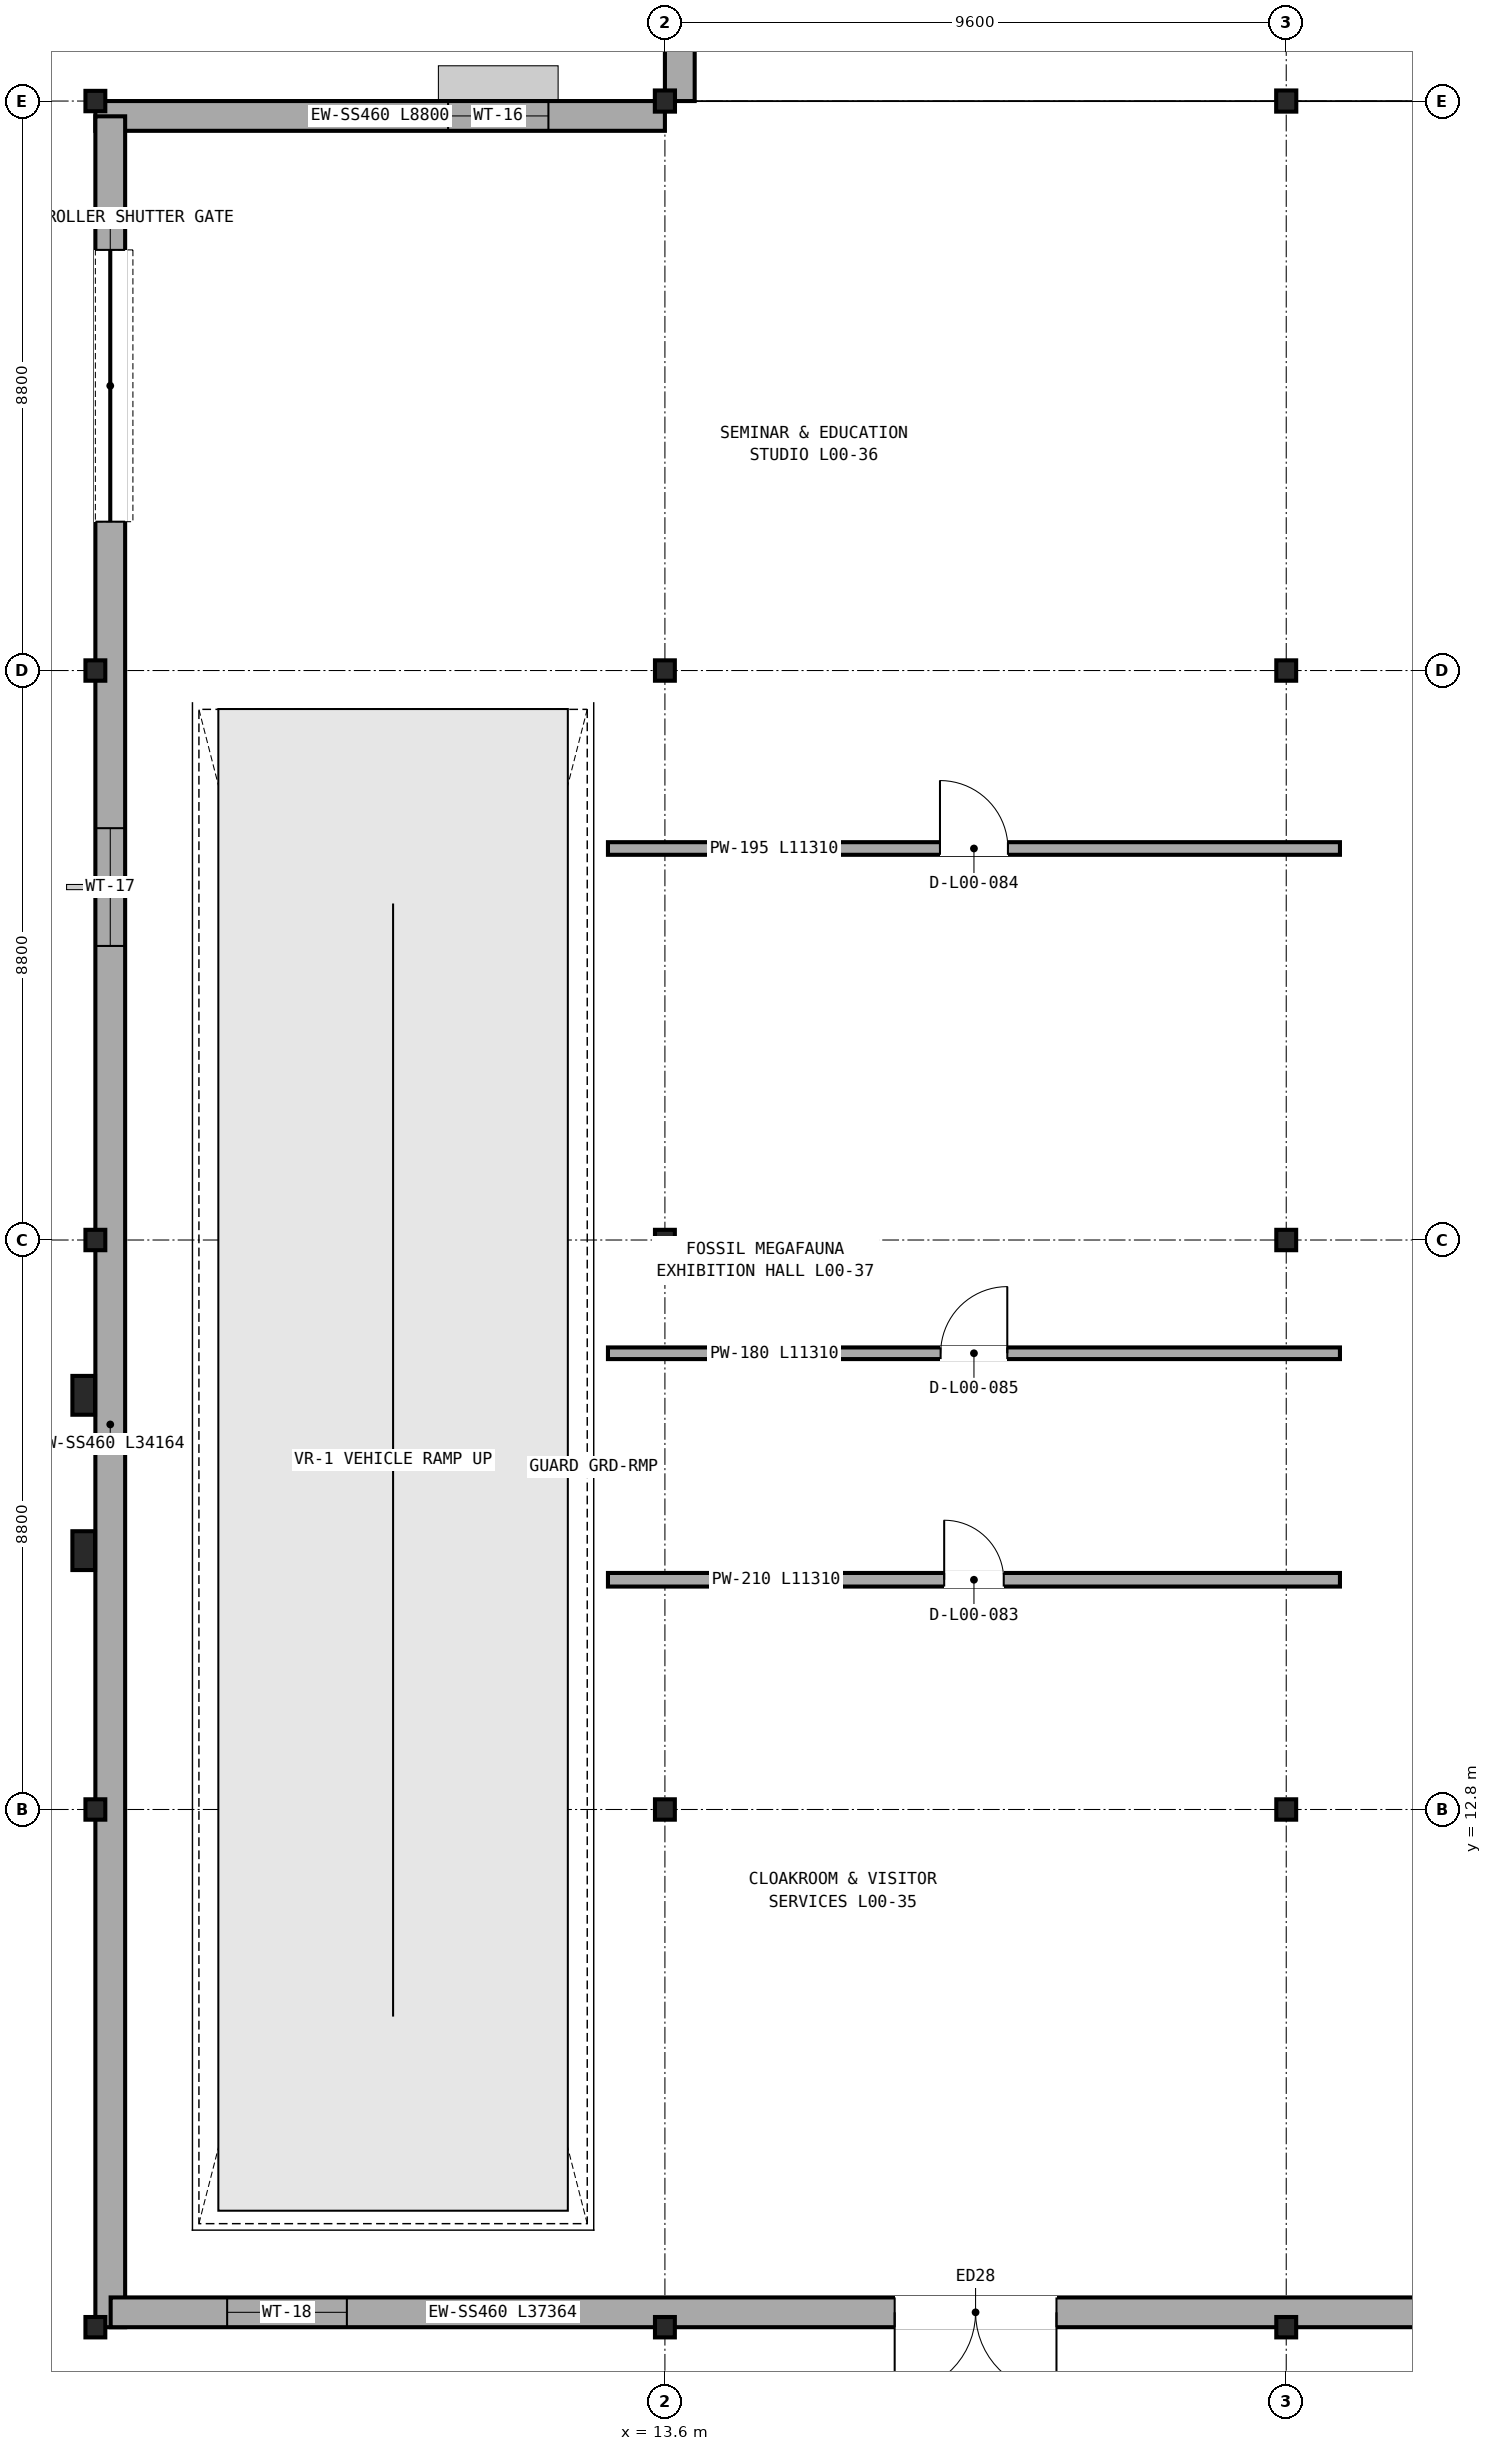
"""IFC4 building model, lengths in metres.
Left out: names, types, materials, properties, quantities, classifications, styles, units other than length and angle.
Written with IfcOpenShell. Run it as: python <this file> out.ifc"""

import sys

from ifc_helpers import new_model, si_unit, direction, frame, frame_2d, origin, origin_2d, place, context, subcontext, project, spatial, rectangle, i_section, extrude, element, fill, save


model = new_model("IFC4")
c1 = context("Model", 3, precision=1e-05, world=origin(), true_north=direction((0.0, 1.0)))
c2 = subcontext(c1, "Body", "Model", "MODEL_VIEW")
j1 = project(units=[si_unit("LENGTHUNIT", "METRE"), si_unit("PLANEANGLEUNIT", "RADIAN")], contexts=[c1])
p1 = place(None, origin())
s1 = spatial("IfcSite", under=j1, at=p1, CompositionType="ELEMENT")
p2 = place(p1, origin())
s2 = spatial("IfcBuilding", under=s1, at=p2, CompositionType="ELEMENT")
p3 = place(p2, origin())
s3 = spatial("IfcBuildingStorey", under=s2, at=p3, CompositionType="ELEMENT", Elevation=0.0)
for number, where, z_axis, x_axis in (
    (1, (4.8, 4.8, 0.0), (0.0, 0.0, 1.0), (1.0, 0.0, 0.0)),
    (2, (4.8, 12.8, 0.0), (0.0, 0.0, 1.0), (1.0, 0.0, 0.0)),
    (3, (4.8, 21.6, 0.0), (0.0, 0.0, 1.0), (1.0, 0.0, 0.0)),
    (4, (4.8, 30.4, 0.0), (0.0, 0.0, 1.0), (1.0, 0.0, 0.0)),
    (5, (4.8, 39.2, 0.0), (0.0, 0.0, 1.0), (1.0, 0.0, 0.0)),
    (6, (13.6, 4.8, 0.0), (0.0, 0.0, 1.0), (1.0, 0.0, 0.0)),
    (7, (13.6, 12.8, 0.0), (0.0, 0.0, 1.0), (1.0, 0.0, 0.0)),
    (8, (13.6, 21.6, 0.0), (0.0, 0.0, 1.0), (1.0, 0.0, 0.0)),
    (9, (13.6, 30.4, 0.0), (0.0, 0.0, 1.0), (1.0, 0.0, 0.0)),
):
    element("IfcColumn", number, at=place(p3, frame(where, z_axis=z_axis, x_axis=x_axis)), inside=s3, PredefinedType="COLUMN", context=c2, shape_type="SweptSolid", body=[
        extrude(i_section(OverallWidth=0.307, OverallDepth=0.315, WebThickness=0.012, FlangeThickness=0.019, FilletRadius=0.017, at=origin_2d()), origin(), (0.0, 0.0, 1.0), 5.6),
    ])
p4 = place(p3, frame((13.6, 39.2, 0.0), z_axis=(0.0, 0.0, 1.0), x_axis=(1.0, 0.0, 0.0)))
e10 = element("IfcColumn", 10, at=p4, inside=s3, PredefinedType="COLUMN", context=c2, shape_type="SweptSolid", body=[
    extrude(i_section(OverallWidth=0.311, OverallDepth=0.327, WebThickness=0.016, FlangeThickness=0.025, FilletRadius=0.017, at=origin_2d()), origin(), (0.0, 0.0, 1.0), 5.6),
])
for number, where, z_axis, x_axis in (
    (11, (23.2, 4.8, 0.0), (0.0, 0.0, 1.0), (1.0, 0.0, 0.0)),
    (12, (23.2, 12.8, 0.0), (0.0, 0.0, 1.0), (1.0, 0.0, 0.0)),
    (13, (23.2, 21.6, 0.0), (0.0, 0.0, 1.0), (1.0, 0.0, 0.0)),
    (14, (23.2, 30.4, 0.0), (0.0, 0.0, 1.0), (1.0, 0.0, 0.0)),
):
    element("IfcColumn", number, at=place(p3, frame(where, z_axis=z_axis, x_axis=x_axis)), inside=s3, PredefinedType="COLUMN", context=c2, shape_type="SweptSolid", body=[
        extrude(i_section(OverallWidth=0.307, OverallDepth=0.315, WebThickness=0.012, FlangeThickness=0.019, FilletRadius=0.017, at=origin_2d()), origin(), (0.0, 0.0, 1.0), 5.6),
    ])
p5 = place(p3, frame((23.2, 39.2, 0.0), z_axis=(0.0, 0.0, 1.0), x_axis=(1.0, 0.0, 0.0)))
e15 = element("IfcColumn", 15, at=p5, inside=s3, PredefinedType="COLUMN", context=c2, shape_type="SweptSolid", body=[
    extrude(i_section(OverallWidth=0.311, OverallDepth=0.327, WebThickness=0.016, FlangeThickness=0.025, FilletRadius=0.017, at=origin_2d()), origin(), (0.0, 0.0, 1.0), 5.6),
])
for number, where, z_axis, x_axis in (
    (16, (4.62, 16.8, 0.0), (0.0, 0.0, 1.0), (0.0, 1.0, 0.0)),
    (17, (4.62, 19.2, 0.0), (0.0, 0.0, 1.0), (0.0, 1.0, 0.0)),
):
    element("IfcColumn", number, at=place(p3, frame(where, z_axis=z_axis, x_axis=x_axis)), inside=s3, PredefinedType="PILASTER", context=c2, shape_type="SweptSolid", body=[
        extrude(rectangle(XDim=0.6, YDim=0.35, at=origin_2d()), origin(), (0.0, 0.0, 1.0), 5.39),
    ])
p6 = place(p3, frame((13.83, 91.764, 0.0), z_axis=(0.0, 0.0, 1.0), x_axis=(0.0, -1.0, 0.0)))
e18 = element("IfcWall", 18, at=p6, inside=s3, PredefinedType="SOLIDWALL", context=c2, shape_type="SweptSolid", body=[
    extrude(rectangle(XDim=52.564, YDim=0.46, at=frame_2d((26.282, 0.0))), origin(), (0.0, 0.0, 1.0), 4.653),
])
p7 = place(p6, frame((29.314, 0.0, 0.0)))
e19 = element("IfcOpeningElement", 19, at=p7, cuts=e18, PredefinedType="OPENING", context=c2, shape_type="SweptSolid", body=[
    extrude(rectangle(XDim=2.5, YDim=2.55, at=frame_2d((1.25, 1.275))), frame((0.0, 0.24, 0.0), z_axis=(0.0, -1.0, 0.0), x_axis=(1.0, 0.0, 0.0)), (0.0, 0.0, 1.0), 0.48),
])
p8 = place(p6, frame((20.539, 0.0, 0.0)))
e20 = element("IfcOpeningElement", 20, at=p8, cuts=e18, PredefinedType="OPENING", context=c2, shape_type="SweptSolid", body=[
    extrude(rectangle(XDim=2.45, YDim=2.5, at=frame_2d((1.225, 1.25))), frame((0.0, 0.24, 0.0), z_axis=(0.0, -1.0, 0.0), x_axis=(1.0, 0.0, 0.0)), (0.0, 0.0, 1.0), 0.48),
])
p9 = place(p6, frame((11.764, 0.0, 0.0)))
e21 = element("IfcOpeningElement", 21, at=p9, cuts=e18, PredefinedType="OPENING", context=c2, shape_type="SweptSolid", body=[
    extrude(rectangle(XDim=2.4, YDim=2.45, at=frame_2d((1.2, 1.225))), frame((0.0, 0.24, 0.0), z_axis=(0.0, -1.0, 0.0), x_axis=(1.0, 0.0, 0.0)), (0.0, 0.0, 1.0), 0.48),
])
p10 = place(p6, frame((3.014, 0.0, 0.0)))
e22 = element("IfcOpeningElement", 22, at=p10, cuts=e18, PredefinedType="OPENING", context=c2, shape_type="SweptSolid", body=[
    extrude(rectangle(XDim=2.3, YDim=2.4, at=frame_2d((1.15, 1.2))), frame((0.0, 0.24, 0.0), z_axis=(0.0, -1.0, 0.0), x_axis=(1.0, 0.0, 0.0)), (0.0, 0.0, 1.0), 0.48),
])
p11 = place(p6, frame((37.564, 0.0, 0.0)))
e23 = element("IfcOpeningElement", 23, at=p11, cuts=e18, PredefinedType="OPENING", context=c2, shape_type="SweptSolid", body=[
    extrude(rectangle(XDim=2.4, YDim=2.45, at=frame_2d((1.2, 1.225))), frame((0.0, 0.24, 0.0), z_axis=(0.0, -1.0, 0.0), x_axis=(1.0, 0.0, 0.0)), (0.0, 0.0, 1.0), 0.48),
])
p12 = place(p6, frame((6.4, 0.0, 0.9)))
e24 = element("IfcOpeningElement", 24, at=p12, cuts=e18, PredefinedType="OPENING", context=c2, shape_type="SweptSolid", body=[
    extrude(rectangle(XDim=1.4, YDim=1.85, at=frame_2d((0.7, 0.925))), frame((0.0, 0.24, 0.0), z_axis=(0.0, -1.0, 0.0), x_axis=(1.0, 0.0, 0.0)), (0.0, 0.0, 1.0), 0.48),
])
p13 = place(p3, frame((13.6, 38.97, 0.0), z_axis=(0.0, 0.0, 1.0), x_axis=(-1.0, 0.0, 0.0)))
e25 = element("IfcWall", 25, at=p13, inside=s3, PredefinedType="SOLIDWALL", context=c2, shape_type="SweptSolid", body=[
    extrude(rectangle(XDim=8.8, YDim=0.46, at=frame_2d((4.4, 0.0))), origin(), (0.0, 0.0, 1.0), 4.653),
])
p14 = place(p13, frame((1.8, 0.0, 0.9)))
e26 = element("IfcOpeningElement", 26, at=p14, cuts=e25, PredefinedType="OPENING", context=c2, shape_type="SweptSolid", body=[
    extrude(rectangle(XDim=1.55, YDim=1.85, at=frame_2d((0.775, 0.925))), frame((0.0, 0.24, 0.0), z_axis=(0.0, -1.0, 0.0), x_axis=(1.0, 0.0, 0.0)), (0.0, 0.0, 1.0), 0.48),
])
p15 = place(p3, frame((5.03, 38.964, 0.0), z_axis=(0.0, 0.0, 1.0), x_axis=(0.0, -1.0, 0.0)))
e27 = element("IfcWall", 27, at=p15, inside=s3, PredefinedType="SOLIDWALL", context=c2, shape_type="SweptSolid", body=[
    extrude(rectangle(XDim=34.164, YDim=0.46, at=frame_2d((17.082, 0.0))), origin(), (0.0, 0.0, 1.0), 4.763),
])
p16 = place(p15, frame((2.064, 0.0, 0.0)))
e28 = element("IfcOpeningElement", 28, at=p16, cuts=e27, PredefinedType="OPENING", context=c2, shape_type="SweptSolid", body=[
    extrude(rectangle(XDim=4.2, YDim=4.1, at=frame_2d((2.1, 2.05))), frame((0.0, 0.24, 0.0), z_axis=(0.0, -1.0, 0.0), x_axis=(1.0, 0.0, 0.0)), (0.0, 0.0, 1.0), 0.48),
])
p17 = place(p15, frame((11.0, 0.0, 0.9)))
e29 = element("IfcOpeningElement", 29, at=p17, cuts=e27, PredefinedType="OPENING", context=c2, shape_type="SweptSolid", body=[
    extrude(rectangle(XDim=1.82, YDim=1.85, at=frame_2d((0.91, 0.925))), frame((0.0, 0.24, 0.0), z_axis=(0.0, -1.0, 0.0), x_axis=(1.0, 0.0, 0.0)), (0.0, 0.0, 1.0), 0.48),
])
p18 = place(p3, frame((5.036, 5.03, 0.0), z_axis=(0.0, 0.0, 1.0), x_axis=(1.0, 0.0, 0.0)))
e30 = element("IfcWall", 30, at=p18, inside=s3, PredefinedType="SOLIDWALL", context=c2, shape_type="SweptSolid", body=[
    extrude(rectangle(XDim=37.364, YDim=0.46, at=frame_2d((18.682, 0.0))), origin(), (0.0, 0.0, 1.0), 4.802),
])
p19 = place(p18, frame((12.114, 0.0, 0.0)))
e31 = element("IfcOpeningElement", 31, at=p19, cuts=e30, PredefinedType="OPENING", context=c2, shape_type="SweptSolid", body=[
    extrude(rectangle(XDim=2.5, YDim=2.55, at=frame_2d((1.25, 1.275))), frame((0.0, 0.24, 0.0), z_axis=(0.0, -1.0, 0.0), x_axis=(1.0, 0.0, 0.0)), (0.0, 0.0, 1.0), 0.48),
])
p20 = place(p18, frame((21.739, 0.0, 0.0)))
e32 = element("IfcOpeningElement", 32, at=p20, cuts=e30, PredefinedType="OPENING", context=c2, shape_type="SweptSolid", body=[
    extrude(rectangle(XDim=2.45, YDim=2.5, at=frame_2d((1.225, 1.25))), frame((0.0, 0.24, 0.0), z_axis=(0.0, -1.0, 0.0), x_axis=(1.0, 0.0, 0.0)), (0.0, 0.0, 1.0), 0.48),
])
p21 = place(p18, frame((31.364, 0.0, 0.0)))
e33 = element("IfcOpeningElement", 33, at=p21, cuts=e30, PredefinedType="OPENING", context=c2, shape_type="SweptSolid", body=[
    extrude(rectangle(XDim=2.4, YDim=2.45, at=frame_2d((1.2, 1.225))), frame((0.0, 0.24, 0.0), z_axis=(0.0, -1.0, 0.0), x_axis=(1.0, 0.0, 0.0)), (0.0, 0.0, 1.0), 0.48),
])
p22 = place(p18, frame((1.8, 0.0, 0.9)))
e34 = element("IfcOpeningElement", 34, at=p22, cuts=e30, PredefinedType="OPENING", context=c2, shape_type="SweptSolid", body=[
    extrude(rectangle(XDim=1.85, YDim=1.85, at=frame_2d((0.925, 0.925))), frame((0.0, 0.24, 0.0), z_axis=(0.0, -1.0, 0.0), x_axis=(1.0, 0.0, 0.0)), (0.0, 0.0, 1.0), 0.48),
])
p23 = place(p3, frame((12.72, 16.35, 0.0), z_axis=(0.0, 0.0, 1.0), x_axis=(1.0, 0.0, 0.0)))
e35 = element("IfcWall", 35, at=p23, inside=s3, PredefinedType="PARTITIONING", context=c2, shape_type="SweptSolid", body=[
    extrude(rectangle(XDim=11.31, YDim=0.21, at=frame_2d((5.655, 0.0))), origin(), (0.0, 0.0, 1.0), 4.717),
])
p24 = place(p23, frame((5.195, 0.0, 0.0)))
e36 = element("IfcOpeningElement", 36, at=p24, cuts=e35, PredefinedType="OPENING", context=c2, shape_type="SweptSolid", body=[
    extrude(rectangle(XDim=0.92, YDim=2.16, at=frame_2d((0.46, 1.08))), frame((0.0, 0.115, 0.0), z_axis=(0.0, -1.0, 0.0), x_axis=(1.0, 0.0, 0.0)), (0.0, 0.0, 1.0), 0.23),
])
p25 = place(p3, frame((24.03, 27.65, 0.0), z_axis=(0.0, 0.0, 1.0), x_axis=(-1.0, 0.0, 0.0)))
e37 = element("IfcWall", 37, at=p25, inside=s3, PredefinedType="PARTITIONING", context=c2, shape_type="SweptSolid", body=[
    extrude(rectangle(XDim=11.31, YDim=0.195, at=frame_2d((5.655, 0.0))), origin(), (0.0, 0.0, 1.0), 4.717),
])
p26 = place(p25, frame((5.13, 0.0, 0.0)))
e38 = element("IfcOpeningElement", 38, at=p26, cuts=e37, PredefinedType="OPENING", context=c2, shape_type="SweptSolid", body=[
    extrude(rectangle(XDim=1.05, YDim=2.15, at=frame_2d((0.525, 1.075))), frame((0.0, 0.107, 0.0), z_axis=(0.0, -1.0, 0.0), x_axis=(1.0, 0.0, 0.0)), (0.0, 0.0, 1.0), 0.215),
])
p27 = place(p3, frame((24.03, 19.85, 0.0), z_axis=(0.0, 0.0, 1.0), x_axis=(-1.0, 0.0, 0.0)))
e39 = element("IfcWall", 39, at=p27, inside=s3, PredefinedType="PARTITIONING", context=c2, shape_type="SweptSolid", body=[
    extrude(rectangle(XDim=11.31, YDim=0.18, at=frame_2d((5.655, 0.0))), origin(), (0.0, 0.0, 1.0), 4.717),
])
p28 = place(p27, frame((5.14, 0.0, 0.0)))
e40 = element("IfcOpeningElement", 40, at=p28, cuts=e39, PredefinedType="OPENING", context=c2, shape_type="SweptSolid", body=[
    extrude(rectangle(XDim=1.03, YDim=2.16, at=frame_2d((0.515, 1.08))), frame((0.0, 0.1, 0.0), z_axis=(0.0, -1.0, 0.0), x_axis=(1.0, 0.0, 0.0)), (0.0, 0.0, 1.0), 0.2),
])
p29 = place(p14, origin())
e41 = element("IfcWindow", 41, at=p29, inside=s3, PartitioningType="SINGLE_PANEL", PredefinedType="WINDOW", context=c2, shape_type="SweptSolid", body=[
    extrude(rectangle(XDim=1.55, YDim=1.85, at=frame_2d((0.775, 0.925))), frame((0.0, 0.03, 0.0), z_axis=(0.0, -1.0, 0.0), x_axis=(1.0, 0.0, 0.0)), (0.0, 0.0, 1.0), 0.06),
])
fill(e26, e41)
p30 = place(p16, frame((4.2, 0.0, 0.0), z_axis=(0.0, 0.0, 1.0), x_axis=(-1.0, 0.0, 0.0)))
e42 = element("IfcDoor", 42, at=p30, inside=s3, OperationType="ROLLINGUP", PredefinedType="DOOR", context=c2, shape_type="SweptSolid", body=[
    extrude(rectangle(XDim=4.2, YDim=4.1, at=frame_2d((2.1, 2.05))), frame((0.0, 0.025, 0.0), z_axis=(0.0, -1.0, 0.0), x_axis=(1.0, 0.0, 0.0)), (0.0, 0.0, 1.0), 0.05),
])
fill(e28, e42)
p31 = place(p17, origin())
e43 = element("IfcWindow", 43, at=p31, inside=s3, PartitioningType="SINGLE_PANEL", PredefinedType="WINDOW", context=c2, shape_type="SweptSolid", body=[
    extrude(rectangle(XDim=1.82, YDim=1.85, at=frame_2d((0.91, 0.925))), frame((0.0, 0.03, 0.0), z_axis=(0.0, -1.0, 0.0), x_axis=(1.0, 0.0, 0.0)), (0.0, 0.0, 1.0), 0.06),
])
fill(e29, e43)
p32 = place(p19, frame((2.5, 0.0, 0.0), z_axis=(0.0, 0.0, 1.0), x_axis=(-1.0, 0.0, 0.0)))
e44 = element("IfcDoor", 44, at=p32, inside=s3, OperationType="DOUBLE_DOOR_SINGLE_SWING", PredefinedType="DOOR", context=c2, shape_type="SweptSolid", body=[
    extrude(rectangle(XDim=2.5, YDim=2.55, at=frame_2d((1.25, 1.275))), frame((0.0, 0.025, 0.0), z_axis=(0.0, -1.0, 0.0), x_axis=(1.0, 0.0, 0.0)), (0.0, 0.0, 1.0), 0.05),
])
fill(e31, e44)
p33 = place(p22, origin())
e45 = element("IfcWindow", 45, at=p33, inside=s3, PartitioningType="SINGLE_PANEL", PredefinedType="WINDOW", context=c2, shape_type="SweptSolid", body=[
    extrude(rectangle(XDim=1.85, YDim=1.85, at=frame_2d((0.925, 0.925))), frame((0.0, 0.03, 0.0), z_axis=(0.0, -1.0, 0.0), x_axis=(1.0, 0.0, 0.0)), (0.0, 0.0, 1.0), 0.06),
])
fill(e34, e45)
p34 = place(p24, origin())
e46 = element("IfcDoor", 46, at=p34, inside=s3, OperationType="SINGLE_SWING_LEFT", PredefinedType="DOOR", context=c2, shape_type="SweptSolid", body=[
    extrude(rectangle(XDim=0.92, YDim=2.16, at=frame_2d((0.46, 1.08))), frame((0.0, 0.025, 0.0), z_axis=(0.0, -1.0, 0.0), x_axis=(1.0, 0.0, 0.0)), (0.0, 0.0, 1.0), 0.05),
])
fill(e36, e46)
p35 = place(p26, frame((1.05, 0.0, 0.0), z_axis=(0.0, 0.0, 1.0), x_axis=(-1.0, 0.0, 0.0)))
e47 = element("IfcDoor", 47, at=p35, inside=s3, OperationType="SINGLE_SWING_RIGHT", PredefinedType="DOOR", context=c2, shape_type="SweptSolid", body=[
    extrude(rectangle(XDim=1.05, YDim=2.15, at=frame_2d((0.525, 1.075))), frame((0.0, 0.025, 0.0), z_axis=(0.0, -1.0, 0.0), x_axis=(1.0, 0.0, 0.0)), (0.0, 0.0, 1.0), 0.05),
])
fill(e38, e47)
p36 = place(p28, frame((1.03, 0.0, 0.0), z_axis=(0.0, 0.0, 1.0), x_axis=(-1.0, 0.0, 0.0)))
e48 = element("IfcDoor", 48, at=p36, inside=s3, OperationType="SINGLE_SWING_LEFT", PredefinedType="DOOR", context=c2, shape_type="SweptSolid", body=[
    extrude(rectangle(XDim=1.03, YDim=2.16, at=frame_2d((0.515, 1.08))), frame((0.0, 0.025, 0.0), z_axis=(0.0, -1.0, 0.0), x_axis=(1.0, 0.0, 0.0)), (0.0, 0.0, 1.0), 0.05),
])
fill(e40, e48)
save(model, sys.argv[1])
